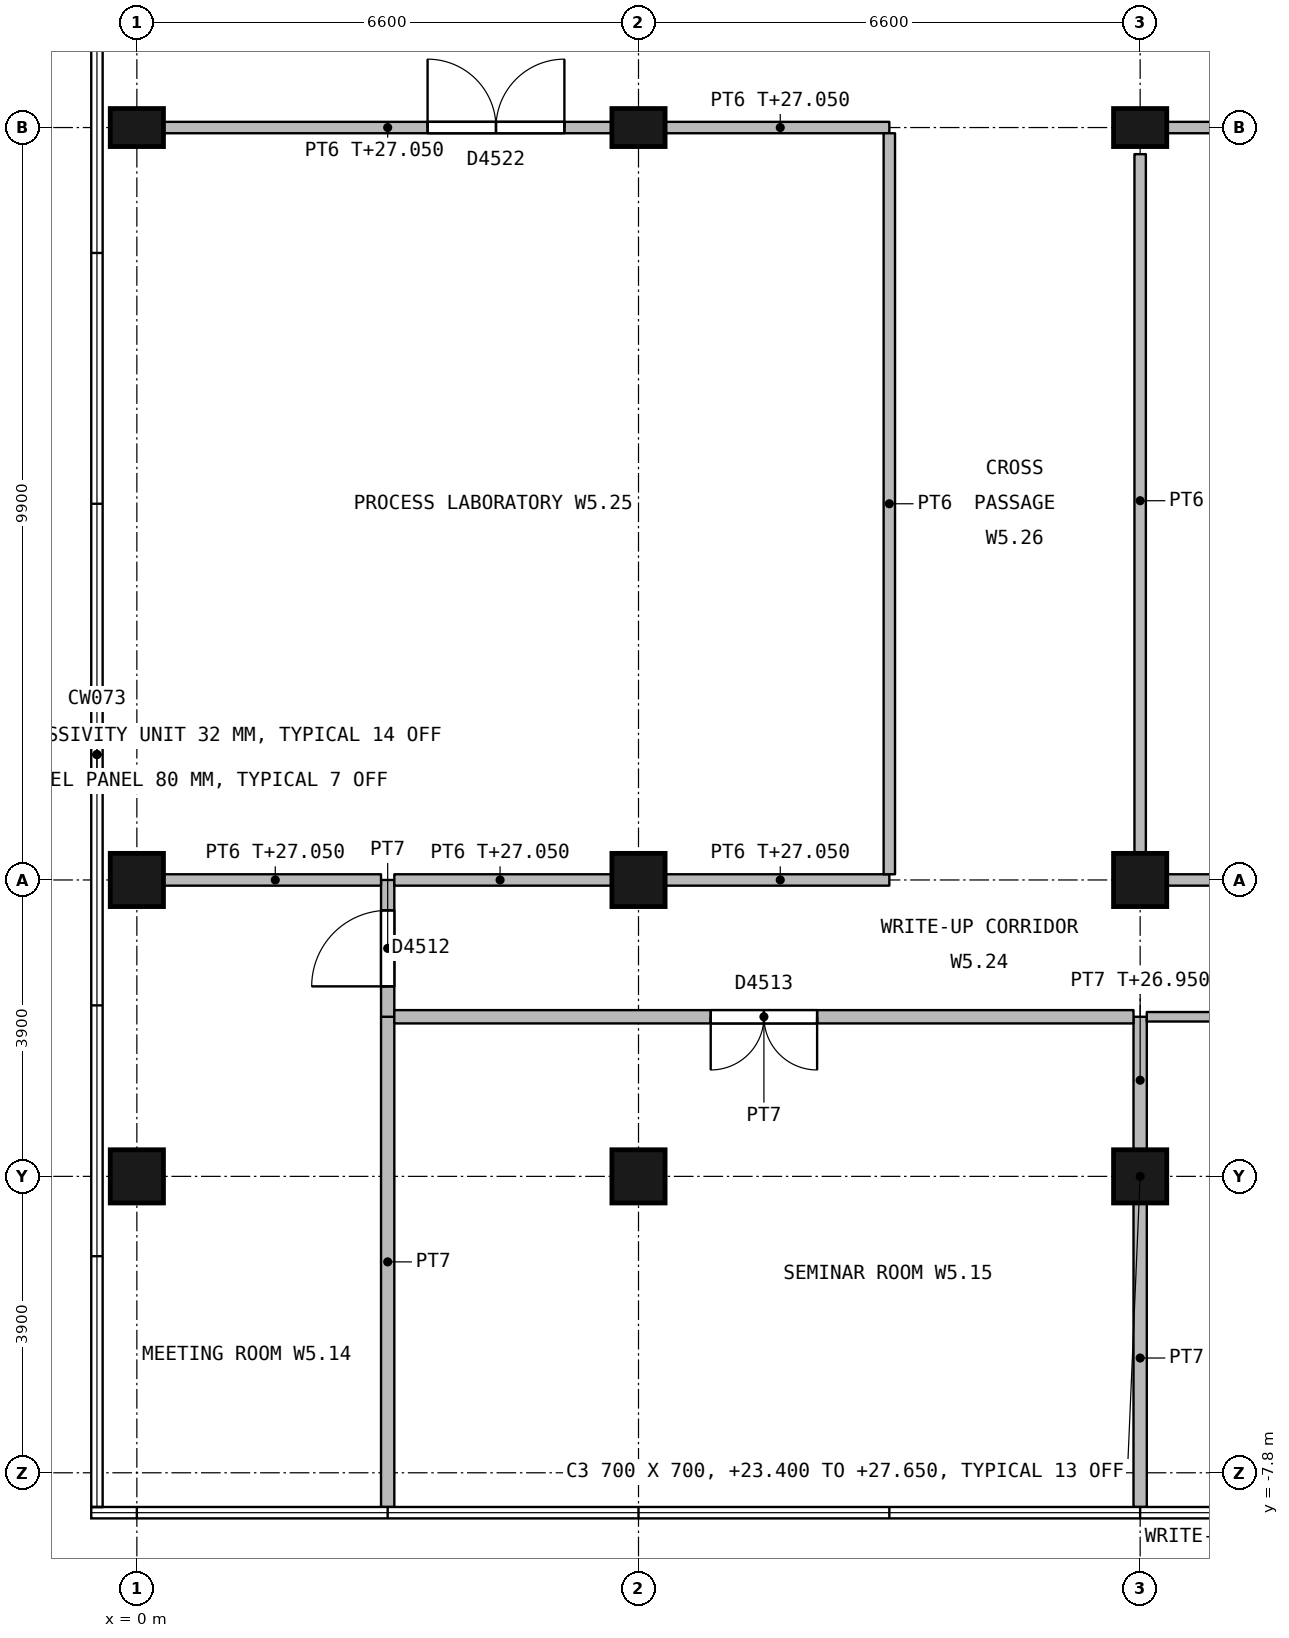
"""IFC4 building model, lengths in metres.
Left out: names, types, materials, properties, quantities, classifications, styles, units other than length and angle.
Written with IfcOpenShell. Run it as: python <this file> out.ifc"""

import sys

from ifc_helpers import new_model, si_unit, direction, frame, frame_2d, origin, origin_with_axes, origin_2d, place, context, subcontext, project, spatial, rectangle, extrude, element, fill, save


model = new_model("IFC4")
c1 = context("Model", 3, precision=1e-05, world=origin(), true_north=direction((0.0, 1.0)))
c2 = subcontext(c1, "Body", "Model", "MODEL_VIEW")
j1 = project(units=[si_unit("LENGTHUNIT", "METRE"), si_unit("PLANEANGLEUNIT", "RADIAN")], contexts=[c1])
p1 = place(None, origin())
s1 = spatial("IfcSite", under=j1, at=p1, CompositionType="ELEMENT")
p2 = place(p1, origin())
s2 = spatial("IfcBuilding", under=s1, at=p2, CompositionType="ELEMENT")
p3 = place(p2, frame((0.0, 0.0, 23.4)))
s3 = spatial("IfcBuildingStorey", under=s2, at=p3, CompositionType="ELEMENT", Elevation=23.4)
p4 = place(p3, origin_with_axes())
e1 = element("IfcColumn", 1, at=p4, inside=s3, PredefinedType="COLUMN", context=c2, shape_type="SweptSolid", body=[
    extrude(rectangle(XDim=0.7, YDim=0.7, at=origin_2d()), origin(), (0.0, 0.0, 1.0), 4.25),
])
p5 = place(p3, frame((0.0, 9.9, 0.0), z_axis=(0.0, 0.0, 1.0), x_axis=(1.0, 0.0, 0.0)))
e2 = element("IfcColumn", 2, at=p5, inside=s3, PredefinedType="COLUMN", context=c2, shape_type="SweptSolid", body=[
    extrude(rectangle(XDim=0.7, YDim=0.5, at=origin_2d()), origin(), (0.0, 0.0, 1.0), 4.25),
])
p6 = place(p3, frame((6.6, 0.0, 0.0), z_axis=(0.0, 0.0, 1.0), x_axis=(1.0, 0.0, 0.0)))
e3 = element("IfcColumn", 3, at=p6, inside=s3, PredefinedType="COLUMN", context=c2, shape_type="SweptSolid", body=[
    extrude(rectangle(XDim=0.7, YDim=0.7, at=origin_2d()), origin(), (0.0, 0.0, 1.0), 4.25),
])
p7 = place(p3, frame((6.6, 9.9, 0.0), z_axis=(0.0, 0.0, 1.0), x_axis=(1.0, 0.0, 0.0)))
e4 = element("IfcColumn", 4, at=p7, inside=s3, PredefinedType="COLUMN", context=c2, shape_type="SweptSolid", body=[
    extrude(rectangle(XDim=0.7, YDim=0.5, at=origin_2d()), origin(), (0.0, 0.0, 1.0), 4.25),
])
p8 = place(p3, frame((13.2, 0.0, 0.0), z_axis=(0.0, 0.0, 1.0), x_axis=(1.0, 0.0, 0.0)))
e5 = element("IfcColumn", 5, at=p8, inside=s3, PredefinedType="COLUMN", context=c2, shape_type="SweptSolid", body=[
    extrude(rectangle(XDim=0.7, YDim=0.7, at=origin_2d()), origin(), (0.0, 0.0, 1.0), 4.25),
])
p9 = place(p3, frame((13.2, 9.9, 0.0), z_axis=(0.0, 0.0, 1.0), x_axis=(1.0, 0.0, 0.0)))
e6 = element("IfcColumn", 6, at=p9, inside=s3, PredefinedType="COLUMN", context=c2, shape_type="SweptSolid", body=[
    extrude(rectangle(XDim=0.7, YDim=0.5, at=origin_2d()), origin(), (0.0, 0.0, 1.0), 4.25),
])
for number, where, z_axis, x_axis in (
    (7, (0.0, -3.9, 0.0), (0.0, 0.0, 1.0), (1.0, 0.0, 0.0)),
    (8, (6.6, -3.9, 0.0), (0.0, 0.0, 1.0), (1.0, 0.0, 0.0)),
    (9, (13.2, -3.9, 0.0), (0.0, 0.0, 1.0), (1.0, 0.0, 0.0)),
):
    element("IfcColumn", number, at=place(p3, frame(where, z_axis=z_axis, x_axis=x_axis)), inside=s3, PredefinedType="COLUMN", context=c2, shape_type="SweptSolid", body=[
        extrude(rectangle(XDim=0.7, YDim=0.7, at=origin_2d()), origin(), (0.0, 0.0, 1.0), 4.25),
    ])
p10 = place(p3, frame((0.35, 9.9, 0.0), z_axis=(0.0, 0.0, 1.0), x_axis=(1.0, 0.0, 0.0)))
e10 = element("IfcWall", 10, at=p10, inside=s3, PredefinedType="PARTITIONING", context=c2, shape_type="SweptSolid", body=[
    extrude(rectangle(XDim=5.9, YDim=0.15, at=frame_2d((2.95, 0.0))), origin(), (0.0, 0.0, 1.0), 3.65),
])
p11 = place(p10, frame((3.475, 0.0, 0.0)))
e11 = element("IfcOpeningElement", 11, at=p11, cuts=e10, PredefinedType="OPENING", context=c2, shape_type="SweptSolid", body=[
    extrude(rectangle(XDim=1.8, YDim=2.4, at=frame_2d((0.9, 1.2))), frame((0.0, 0.085, 0.0), z_axis=(0.0, -1.0, 0.0), x_axis=(1.0, 0.0, 0.0)), (0.0, 0.0, 1.0), 0.17),
])
p12 = place(p3, frame((6.95, 9.9, 0.0), z_axis=(0.0, 0.0, 1.0), x_axis=(1.0, 0.0, 0.0)))
e12 = element("IfcWall", 12, at=p12, inside=s3, PredefinedType="PARTITIONING", context=c2, shape_type="SweptSolid", body=[
    extrude(rectangle(XDim=2.95, YDim=0.15, at=frame_2d((1.475, 0.0))), origin(), (0.0, 0.0, 1.0), 3.65),
])
p13 = place(p3, frame((13.55, 9.9, 0.0), z_axis=(0.0, 0.0, 1.0), x_axis=(1.0, 0.0, 0.0)))
e13 = element("IfcWall", 13, at=p13, inside=s3, PredefinedType="PARTITIONING", context=c2, shape_type="SweptSolid", body=[
    extrude(rectangle(XDim=5.9, YDim=0.15, at=frame_2d((2.95, 0.0))), origin(), (0.0, 0.0, 1.0), 3.65),
])
p14 = place(p13, frame((3.7, 0.0, 0.0)))
e14 = element("IfcOpeningElement", 14, at=p14, cuts=e13, PredefinedType="OPENING", context=c2, shape_type="SweptSolid", body=[
    extrude(rectangle(XDim=1.8, YDim=2.4, at=frame_2d((0.9, 1.2))), frame((0.0, 0.085, 0.0), z_axis=(0.0, -1.0, 0.0), x_axis=(1.0, 0.0, 0.0)), (0.0, 0.0, 1.0), 0.17),
])
p15 = place(p3, frame((3.3, -8.25, 0.0), z_axis=(0.0, 0.0, 1.0), x_axis=(0.0, 1.0, 0.0)))
e15 = element("IfcWall", 15, at=p15, inside=s3, PredefinedType="PARTITIONING", context=c2, shape_type="SweptSolid", body=[
    extrude(rectangle(XDim=6.45, YDim=0.175, at=frame_2d((3.225, 0.0))), origin(), (0.0, 0.0, 1.0), 4.25),
])
p16 = place(p3, frame((3.3, -1.8, 0.0), z_axis=(0.0, 0.0, 1.0), x_axis=(0.0, 1.0, 0.0)))
e16 = element("IfcWall", 16, at=p16, inside=s3, PredefinedType="PARTITIONING", context=c2, shape_type="SweptSolid", body=[
    extrude(rectangle(XDim=1.8, YDim=0.175, at=frame_2d((0.9, 0.0))), origin(), (0.0, 0.0, 1.0), 4.25),
])
p17 = place(p16, frame((0.4, 0.0, 0.0)))
e17 = element("IfcOpeningElement", 17, at=p17, cuts=e16, PredefinedType="OPENING", context=c2, shape_type="SweptSolid", body=[
    extrude(rectangle(XDim=1.0, YDim=2.1, at=frame_2d((0.5, 1.05))), frame((0.0, 0.097, 0.0), z_axis=(0.0, -1.0, 0.0), x_axis=(1.0, 0.0, 0.0)), (0.0, 0.0, 1.0), 0.195),
])
p18 = place(p3, frame((3.212, 0.0, 0.0), z_axis=(0.0, 0.0, 1.0), x_axis=(-1.0, 0.0, 0.0)))
e18 = element("IfcWall", 18, at=p18, inside=s3, PredefinedType="PARTITIONING", context=c2, shape_type="SweptSolid", body=[
    extrude(rectangle(XDim=2.862, YDim=0.15, at=frame_2d((1.431, 0.0))), origin(), (0.0, 0.0, 1.0), 3.65),
])
p19 = place(p3, frame((13.2, -8.25, 0.0), z_axis=(0.0, 0.0, 1.0), x_axis=(0.0, 1.0, 0.0)))
e19 = element("IfcWall", 19, at=p19, inside=s3, PredefinedType="PARTITIONING", context=c2, shape_type="SweptSolid", body=[
    extrude(rectangle(XDim=4.0, YDim=0.175, at=frame_2d((2.0, 0.0))), origin(), (0.0, 0.0, 1.0), 3.45),
])
p20 = place(p3, frame((13.2, -3.55, 0.0), z_axis=(0.0, 0.0, 1.0), x_axis=(0.0, 1.0, 0.0)))
e20 = element("IfcWall", 20, at=p20, inside=s3, PredefinedType="PARTITIONING", context=c2, shape_type="SweptSolid", body=[
    extrude(rectangle(XDim=1.75, YDim=0.175, at=frame_2d((0.875, 0.0))), origin(), (0.0, 0.0, 1.0), 3.55),
])
p21 = place(p3, frame((13.113, -1.8, 0.0), z_axis=(0.0, 0.0, 1.0), x_axis=(-1.0, 0.0, 0.0)))
e21 = element("IfcWall", 21, at=p21, inside=s3, PredefinedType="PARTITIONING", context=c2, shape_type="SweptSolid", body=[
    extrude(rectangle(XDim=9.725, YDim=0.175, at=frame_2d((4.863, 0.0))), origin(), (0.0, 0.0, 1.0), 4.25),
])
p22 = place(p21, frame((4.163, 0.0, 0.0)))
e22 = element("IfcOpeningElement", 22, at=p22, cuts=e21, PredefinedType="OPENING", context=c2, shape_type="SweptSolid", body=[
    extrude(rectangle(XDim=1.4, YDim=2.1, at=frame_2d((0.7, 1.05))), frame((0.0, 0.097, 0.0), z_axis=(0.0, -1.0, 0.0), x_axis=(1.0, 0.0, 0.0)), (0.0, 0.0, 1.0), 0.195),
])
p23 = place(p3, frame((16.445, -1.8, 0.0), z_axis=(0.0, 0.0, 1.0), x_axis=(-1.0, 0.0, 0.0)))
e23 = element("IfcWall", 23, at=p23, inside=s3, PredefinedType="PARTITIONING", context=c2, shape_type="SweptSolid", body=[
    extrude(rectangle(XDim=3.157, YDim=0.125, at=frame_2d((1.579, 0.0))), origin(), (0.0, 0.0, 1.0), 4.25),
])
p24 = place(p23, frame((1.145, 0.0, 0.0)))
e24 = element("IfcOpeningElement", 24, at=p24, cuts=e23, PredefinedType="OPENING", context=c2, shape_type="SweptSolid", body=[
    extrude(rectangle(XDim=0.9, YDim=2.1, at=frame_2d((0.45, 1.05))), frame((0.0, 0.073, 0.0), z_axis=(0.0, -1.0, 0.0), x_axis=(1.0, 0.0, 0.0)), (0.0, 0.0, 1.0), 0.145),
])
p25 = place(p3, frame((9.9, 0.0, 0.0), z_axis=(0.0, 0.0, 1.0), x_axis=(-1.0, 0.0, 0.0)))
e25 = element("IfcWall", 25, at=p25, inside=s3, PredefinedType="PARTITIONING", context=c2, shape_type="SweptSolid", body=[
    extrude(rectangle(XDim=2.95, YDim=0.15, at=frame_2d((1.475, 0.0))), origin(), (0.0, 0.0, 1.0), 3.65),
])
p26 = place(p3, frame((6.25, 0.0, 0.0), z_axis=(0.0, 0.0, 1.0), x_axis=(-1.0, 0.0, 0.0)))
e26 = element("IfcWall", 26, at=p26, inside=s3, PredefinedType="PARTITIONING", context=c2, shape_type="SweptSolid", body=[
    extrude(rectangle(XDim=2.863, YDim=0.15, at=frame_2d((1.431, 0.0))), origin(), (0.0, 0.0, 1.0), 3.65),
])
p27 = place(p3, frame((19.45, 0.0, 0.0), z_axis=(0.0, 0.0, 1.0), x_axis=(-1.0, 0.0, 0.0)))
e27 = element("IfcWall", 27, at=p27, inside=s3, PredefinedType="PARTITIONING", context=c2, shape_type="SweptSolid", body=[
    extrude(rectangle(XDim=5.9, YDim=0.15, at=frame_2d((2.95, 0.0))), origin(), (0.0, 0.0, 1.0), 3.65),
])
p28 = place(p3, frame((9.9, 0.075, 0.0), z_axis=(0.0, 0.0, 1.0), x_axis=(0.0, 1.0, 0.0)))
e28 = element("IfcWall", 28, at=p28, inside=s3, PredefinedType="PARTITIONING", context=c2, shape_type="SweptSolid", body=[
    extrude(rectangle(XDim=9.75, YDim=0.15, at=frame_2d((4.875, 0.0))), origin(), (0.0, 0.0, 1.0), 4.25),
])
p29 = place(p3, frame((13.2, 0.35, 0.0), z_axis=(0.0, 0.0, 1.0), x_axis=(0.0, 1.0, 0.0)))
e29 = element("IfcWall", 29, at=p29, inside=s3, PredefinedType="PARTITIONING", context=c2, shape_type="SweptSolid", body=[
    extrude(rectangle(XDim=9.2, YDim=0.15, at=frame_2d((4.6, 0.0))), origin(), (0.0, 0.0, 1.0), 3.45),
])
p30 = place(p17, origin())
e30 = element("IfcDoor", 30, at=p30, inside=s3, OperationType="SINGLE_SWING_LEFT", PredefinedType="DOOR", context=c2, shape_type="SweptSolid", body=[
    extrude(rectangle(XDim=1.0, YDim=2.1, at=frame_2d((0.5, 1.05))), frame((0.0, 0.027, 0.0), z_axis=(0.0, -1.0, 0.0), x_axis=(1.0, 0.0, 0.0)), (0.0, 0.0, 1.0), 0.054),
])
fill(e17, e30)
p31 = place(p22, origin())
e31 = element("IfcDoor", 31, at=p31, inside=s3, OperationType="DOUBLE_DOOR_SINGLE_SWING", PredefinedType="DOOR", context=c2, shape_type="SweptSolid", body=[
    extrude(rectangle(XDim=1.4, YDim=2.1, at=frame_2d((0.7, 1.05))), frame((0.0, 0.027, 0.0), z_axis=(0.0, -1.0, 0.0), x_axis=(1.0, 0.0, 0.0)), (0.0, 0.0, 1.0), 0.054),
])
fill(e22, e31)
p32 = place(p11, origin())
e32 = element("IfcDoor", 32, at=p32, inside=s3, OperationType="DOUBLE_DOOR_SINGLE_SWING", PredefinedType="DOOR", context=c2, shape_type="SweptSolid", body=[
    extrude(rectangle(XDim=1.8, YDim=2.4, at=frame_2d((0.9, 1.2))), frame((0.0, 0.027, 0.0), z_axis=(0.0, -1.0, 0.0), x_axis=(1.0, 0.0, 0.0)), (0.0, 0.0, 1.0), 0.054),
])
fill(e11, e32)
save(model, sys.argv[1])
